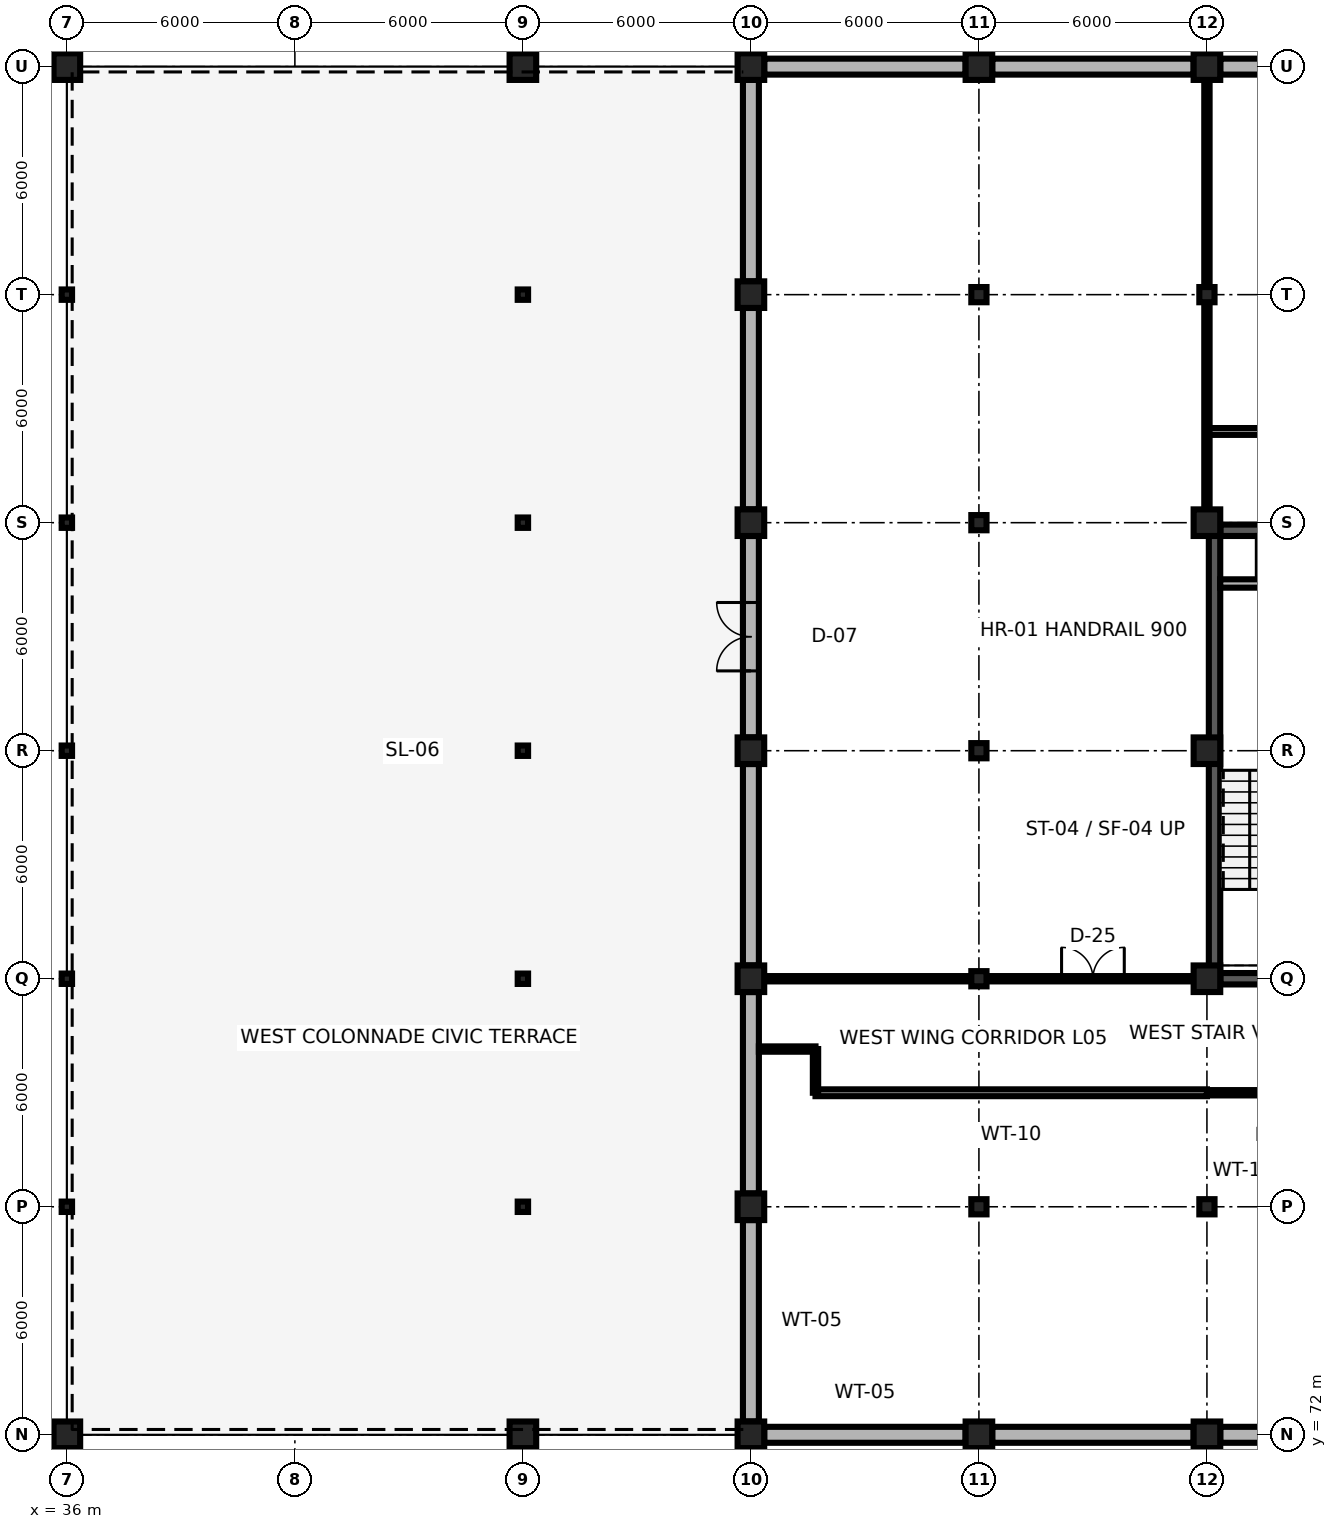
"""IFC4 building model, lengths in metres.
Left out: names, types, materials, properties, quantities, classifications, styles, units other than length and angle.
Written with IfcOpenShell. Run it as: python <this file> out.ifc"""

import sys

from ifc_helpers import new_model, si_unit, direction, frame, frame_2d, origin, origin_2d, place, context, subcontext, project, spatial, rectangle, hollow_circle, i_section, extrude, element, fill, save


model = new_model("IFC4")
c1 = context("Model", 3, precision=1e-05, world=origin(), true_north=direction((0.0, 1.0)))
c2 = subcontext(c1, "Body", "Model", "MODEL_VIEW")
j1 = project(units=[si_unit("LENGTHUNIT", "METRE"), si_unit("PLANEANGLEUNIT", "RADIAN")], contexts=[c1])
p1 = place(None, origin())
s1 = spatial("IfcSite", under=j1, at=p1, CompositionType="ELEMENT")
p2 = place(p1, origin())
s2 = spatial("IfcBuilding", under=s1, at=p2, CompositionType="ELEMENT")
p3 = place(p2, frame((0.0, 0.0, 21.0)))
s3 = spatial("IfcBuildingStorey", under=s2, at=p3, CompositionType="ELEMENT", Elevation=21.0)
for number, where, z_axis, x_axis in (
    (1, (36.0, 72.0, 0.0), (0.0, 0.0, 1.0), (1.0, 0.0, 0.0)),
    (2, (48.0, 72.0, 0.0), (0.0, 0.0, 1.0), (1.0, 0.0, 0.0)),
):
    element("IfcColumn", number, at=place(p3, frame(where, z_axis=z_axis, x_axis=x_axis)), inside=s3, PredefinedType="COLUMN", context=c2, shape_type="SweptSolid", body=[
        extrude(rectangle(XDim=0.7, YDim=0.7, at=origin_2d()), origin(), (0.0, 0.0, 1.0), 3.7),
    ])
for number, where, z_axis, x_axis in (
    (3, (54.0, 72.0, 0.0), (0.0, 0.0, 1.0), (1.0, 0.0, 0.0)),
    (4, (60.0, 72.0, 0.0), (0.0, 0.0, 1.0), (1.0, 0.0, 0.0)),
    (5, (66.0, 72.0, 0.0), (0.0, 0.0, 1.0), (1.0, 0.0, 0.0)),
):
    element("IfcColumn", number, at=place(p3, frame(where, z_axis=z_axis, x_axis=x_axis)), inside=s3, PredefinedType="COLUMN", context=c2, shape_type="SweptSolid", body=[
        extrude(rectangle(XDim=0.7, YDim=0.7, at=origin_2d()), origin(), (0.0, 0.0, 1.0), 3.9),
    ])
for number, where, z_axis, x_axis in (
    (6, (36.0, 78.0, 0.0), (0.0, 0.0, 1.0), (1.0, 0.0, 0.0)),
    (7, (48.0, 78.0, 0.0), (0.0, 0.0, 1.0), (1.0, 0.0, 0.0)),
):
    element("IfcColumn", number, at=place(p3, frame(where, z_axis=z_axis, x_axis=x_axis)), inside=s3, PredefinedType="COLUMN", context=c2, shape_type="SweptSolid", body=[
        extrude(hollow_circle(Radius=0.136, WallThickness=0.01, at=origin_2d()), origin(), (0.0, 0.0, 1.0), 3.7),
    ])
p4 = place(p3, frame((54.0, 78.0, 0.0), z_axis=(0.0, 0.0, 1.0), x_axis=(1.0, 0.0, 0.0)))
e8 = element("IfcColumn", 8, at=p4, inside=s3, PredefinedType="COLUMN", context=c2, shape_type="SweptSolid", body=[
    extrude(rectangle(XDim=0.7, YDim=0.7, at=origin_2d()), origin(), (0.0, 0.0, 1.0), 3.9),
])
for number, where, z_axis, x_axis in (
    (9, (60.0, 78.0, 0.0), (0.0, 0.0, 1.0), (1.0, 0.0, 0.0)),
    (10, (66.0, 78.0, 0.0), (0.0, 0.0, 1.0), (1.0, 0.0, 0.0)),
):
    element("IfcColumn", number, at=place(p3, frame(where, z_axis=z_axis, x_axis=x_axis)), inside=s3, PredefinedType="COLUMN", context=c2, shape_type="SweptSolid", body=[
        extrude(i_section(OverallWidth=0.4, OverallDepth=0.4, WebThickness=0.013, FlangeThickness=0.021, FilletRadius=0.022, at=origin_2d()), origin(), (0.0, 0.0, 1.0), 3.9),
    ])
for number, where, z_axis, x_axis in (
    (11, (36.0, 84.0, 0.0), (0.0, 0.0, 1.0), (1.0, 0.0, 0.0)),
    (12, (48.0, 84.0, 0.0), (0.0, 0.0, 1.0), (1.0, 0.0, 0.0)),
):
    element("IfcColumn", number, at=place(p3, frame(where, z_axis=z_axis, x_axis=x_axis)), inside=s3, PredefinedType="COLUMN", context=c2, shape_type="SweptSolid", body=[
        extrude(hollow_circle(Radius=0.136, WallThickness=0.01, at=origin_2d()), origin(), (0.0, 0.0, 1.0), 3.7),
    ])
p5 = place(p3, frame((54.0, 84.0, 0.0), z_axis=(0.0, 0.0, 1.0), x_axis=(1.0, 0.0, 0.0)))
e13 = element("IfcColumn", 13, at=p5, inside=s3, PredefinedType="COLUMN", context=c2, shape_type="SweptSolid", body=[
    extrude(rectangle(XDim=0.7, YDim=0.7, at=origin_2d()), origin(), (0.0, 0.0, 1.0), 3.9),
])
p6 = place(p3, frame((60.0, 84.0, 0.0), z_axis=(0.0, 0.0, 1.0), x_axis=(1.0, 0.0, 0.0)))
e14 = element("IfcColumn", 14, at=p6, inside=s3, PredefinedType="COLUMN", context=c2, shape_type="SweptSolid", body=[
    extrude(i_section(OverallWidth=0.4, OverallDepth=0.4, WebThickness=0.013, FlangeThickness=0.021, FilletRadius=0.022, at=origin_2d()), origin(), (0.0, 0.0, 1.0), 3.9),
])
p7 = place(p3, frame((66.0, 84.0, 0.0), z_axis=(0.0, 0.0, 1.0), x_axis=(1.0, 0.0, 0.0)))
e15 = element("IfcColumn", 15, at=p7, inside=s3, PredefinedType="COLUMN", context=c2, shape_type="SweptSolid", body=[
    extrude(rectangle(XDim=0.7, YDim=0.7, at=origin_2d()), origin(), (0.0, 0.0, 1.0), 3.9),
])
for number, where, z_axis, x_axis in (
    (16, (36.0, 90.0, 0.0), (0.0, 0.0, 1.0), (1.0, 0.0, 0.0)),
    (17, (48.0, 90.0, 0.0), (0.0, 0.0, 1.0), (1.0, 0.0, 0.0)),
):
    element("IfcColumn", number, at=place(p3, frame(where, z_axis=z_axis, x_axis=x_axis)), inside=s3, PredefinedType="COLUMN", context=c2, shape_type="SweptSolid", body=[
        extrude(hollow_circle(Radius=0.136, WallThickness=0.01, at=origin_2d()), origin(), (0.0, 0.0, 1.0), 3.7),
    ])
p8 = place(p3, frame((54.0, 90.0, 0.0), z_axis=(0.0, 0.0, 1.0), x_axis=(1.0, 0.0, 0.0)))
e18 = element("IfcColumn", 18, at=p8, inside=s3, PredefinedType="COLUMN", context=c2, shape_type="SweptSolid", body=[
    extrude(rectangle(XDim=0.7, YDim=0.7, at=origin_2d()), origin(), (0.0, 0.0, 1.0), 3.9),
])
p9 = place(p3, frame((60.0, 90.0, 0.0), z_axis=(0.0, 0.0, 1.0), x_axis=(1.0, 0.0, 0.0)))
e19 = element("IfcColumn", 19, at=p9, inside=s3, PredefinedType="COLUMN", context=c2, shape_type="SweptSolid", body=[
    extrude(i_section(OverallWidth=0.4, OverallDepth=0.4, WebThickness=0.013, FlangeThickness=0.021, FilletRadius=0.022, at=origin_2d()), origin(), (0.0, 0.0, 1.0), 3.9),
])
p10 = place(p3, frame((66.0, 90.0, 0.0), z_axis=(0.0, 0.0, 1.0), x_axis=(1.0, 0.0, 0.0)))
e20 = element("IfcColumn", 20, at=p10, inside=s3, PredefinedType="COLUMN", context=c2, shape_type="SweptSolid", body=[
    extrude(rectangle(XDim=0.7, YDim=0.7, at=origin_2d()), origin(), (0.0, 0.0, 1.0), 3.9),
])
for number, where, z_axis, x_axis in (
    (21, (36.0, 96.0, 0.0), (0.0, 0.0, 1.0), (1.0, 0.0, 0.0)),
    (22, (48.0, 96.0, 0.0), (0.0, 0.0, 1.0), (1.0, 0.0, 0.0)),
):
    element("IfcColumn", number, at=place(p3, frame(where, z_axis=z_axis, x_axis=x_axis)), inside=s3, PredefinedType="COLUMN", context=c2, shape_type="SweptSolid", body=[
        extrude(hollow_circle(Radius=0.136, WallThickness=0.01, at=origin_2d()), origin(), (0.0, 0.0, 1.0), 3.7),
    ])
p11 = place(p3, frame((54.0, 96.0, 0.0), z_axis=(0.0, 0.0, 1.0), x_axis=(1.0, 0.0, 0.0)))
e23 = element("IfcColumn", 23, at=p11, inside=s3, PredefinedType="COLUMN", context=c2, shape_type="SweptSolid", body=[
    extrude(rectangle(XDim=0.7, YDim=0.7, at=origin_2d()), origin(), (0.0, 0.0, 1.0), 3.9),
])
p12 = place(p3, frame((60.0, 96.0, 0.0), z_axis=(0.0, 0.0, 1.0), x_axis=(1.0, 0.0, 0.0)))
e24 = element("IfcColumn", 24, at=p12, inside=s3, PredefinedType="COLUMN", context=c2, shape_type="SweptSolid", body=[
    extrude(i_section(OverallWidth=0.4, OverallDepth=0.4, WebThickness=0.013, FlangeThickness=0.021, FilletRadius=0.022, at=origin_2d()), origin(), (0.0, 0.0, 1.0), 3.9),
])
p13 = place(p3, frame((66.0, 96.0, 0.0), z_axis=(0.0, 0.0, 1.0), x_axis=(1.0, 0.0, 0.0)))
e25 = element("IfcColumn", 25, at=p13, inside=s3, PredefinedType="COLUMN", context=c2, shape_type="SweptSolid", body=[
    extrude(rectangle(XDim=0.7, YDim=0.7, at=origin_2d()), origin(), (0.0, 0.0, 1.0), 3.9),
])
for number, where, z_axis, x_axis in (
    (26, (36.0, 102.0, 0.0), (0.0, 0.0, 1.0), (1.0, 0.0, 0.0)),
    (27, (48.0, 102.0, 0.0), (0.0, 0.0, 1.0), (1.0, 0.0, 0.0)),
):
    element("IfcColumn", number, at=place(p3, frame(where, z_axis=z_axis, x_axis=x_axis)), inside=s3, PredefinedType="COLUMN", context=c2, shape_type="SweptSolid", body=[
        extrude(hollow_circle(Radius=0.136, WallThickness=0.01, at=origin_2d()), origin(), (0.0, 0.0, 1.0), 3.7),
    ])
p14 = place(p3, frame((54.0, 102.0, 0.0), z_axis=(0.0, 0.0, 1.0), x_axis=(1.0, 0.0, 0.0)))
e28 = element("IfcColumn", 28, at=p14, inside=s3, PredefinedType="COLUMN", context=c2, shape_type="SweptSolid", body=[
    extrude(rectangle(XDim=0.7, YDim=0.7, at=origin_2d()), origin(), (0.0, 0.0, 1.0), 3.9),
])
for number, where, z_axis, x_axis in (
    (29, (60.0, 102.0, 0.0), (0.0, 0.0, 1.0), (1.0, 0.0, 0.0)),
    (30, (66.0, 102.0, 0.0), (0.0, 0.0, 1.0), (1.0, 0.0, 0.0)),
):
    element("IfcColumn", number, at=place(p3, frame(where, z_axis=z_axis, x_axis=x_axis)), inside=s3, PredefinedType="COLUMN", context=c2, shape_type="SweptSolid", body=[
        extrude(i_section(OverallWidth=0.4, OverallDepth=0.4, WebThickness=0.013, FlangeThickness=0.021, FilletRadius=0.022, at=origin_2d()), origin(), (0.0, 0.0, 1.0), 3.9),
    ])
for number, where, z_axis, x_axis in (
    (31, (36.0, 108.0, 0.0), (0.0, 0.0, 1.0), (1.0, 0.0, 0.0)),
    (32, (48.0, 108.0, 0.0), (0.0, 0.0, 1.0), (1.0, 0.0, 0.0)),
):
    element("IfcColumn", number, at=place(p3, frame(where, z_axis=z_axis, x_axis=x_axis)), inside=s3, PredefinedType="COLUMN", context=c2, shape_type="SweptSolid", body=[
        extrude(rectangle(XDim=0.7, YDim=0.7, at=origin_2d()), origin(), (0.0, 0.0, 1.0), 3.7),
    ])
for number, where, z_axis, x_axis in (
    (33, (54.0, 108.0, 0.0), (0.0, 0.0, 1.0), (1.0, 0.0, 0.0)),
    (34, (60.0, 108.0, 0.0), (0.0, 0.0, 1.0), (1.0, 0.0, 0.0)),
    (35, (66.0, 108.0, 0.0), (0.0, 0.0, 1.0), (1.0, 0.0, 0.0)),
):
    element("IfcColumn", number, at=place(p3, frame(where, z_axis=z_axis, x_axis=x_axis)), inside=s3, PredefinedType="COLUMN", context=c2, shape_type="SweptSolid", body=[
        extrude(rectangle(XDim=0.7, YDim=0.7, at=origin_2d()), origin(), (0.0, 0.0, 1.0), 3.9),
    ])
for number, where, z_axis, x_axis in (
    (36, (54.35, 72.0, 0.0), (0.0, 0.0, 1.0), (1.0, 0.0, 0.0)),
    (37, (60.35, 72.0, 0.0), (0.0, 0.0, 1.0), (1.0, 0.0, 0.0)),
    (38, (66.35, 72.0, 0.0), (0.0, 0.0, 1.0), (1.0, 0.0, 0.0)),
    (39, (54.35, 108.0, 0.0), (0.0, 0.0, 1.0), (1.0, 0.0, 0.0)),
    (40, (60.35, 108.0, 0.0), (0.0, 0.0, 1.0), (1.0, 0.0, 0.0)),
    (41, (66.35, 108.0, 0.0), (0.0, 0.0, 1.0), (1.0, 0.0, 0.0)),
    (42, (54.0, 72.35, 0.0), (0.0, 0.0, 1.0), (0.0, 1.0, 0.0)),
    (43, (54.0, 78.35, 0.0), (0.0, 0.0, 1.0), (0.0, 1.0, 0.0)),
    (44, (54.0, 84.35, 0.0), (0.0, 0.0, 1.0), (0.0, 1.0, 0.0)),
):
    element("IfcWall", number, at=place(p3, frame(where, z_axis=z_axis, x_axis=x_axis)), inside=s3, PredefinedType="SOLIDWALL", context=c2, shape_type="SweptSolid", body=[
        extrude(rectangle(XDim=5.3, YDim=0.42, at=frame_2d((2.65, 0.0))), origin(), (0.0, 0.0, 1.0), 3.28),
    ])
p15 = place(p3, frame((54.0, 90.35, 0.0), z_axis=(0.0, 0.0, 1.0), x_axis=(0.0, 1.0, 0.0)))
e45 = element("IfcWall", 45, at=p15, inside=s3, PredefinedType="SOLIDWALL", context=c2, shape_type="SweptSolid", body=[
    extrude(rectangle(XDim=5.3, YDim=0.42, at=frame_2d((2.65, 0.0))), origin(), (0.0, 0.0, 1.0), 3.28),
])
p16 = place(p15, frame((1.75, 0.0, 0.0)))
e46 = element("IfcOpeningElement", 46, at=p16, cuts=e45, PredefinedType="OPENING", context=c2, shape_type="SweptSolid", body=[
    extrude(rectangle(XDim=1.8, YDim=2.5, at=frame_2d((0.9, 1.25))), frame((0.0, 0.225, 0.0), z_axis=(0.0, -1.0, 0.0), x_axis=(1.0, 0.0, 0.0)), (0.0, 0.0, 1.0), 0.45),
])
for number, where, z_axis, x_axis in (
    (47, (54.0, 96.35, 0.0), (0.0, 0.0, 1.0), (0.0, 1.0, 0.0)),
    (48, (54.0, 102.35, 0.0), (0.0, 0.0, 1.0), (0.0, 1.0, 0.0)),
):
    element("IfcWall", number, at=place(p3, frame(where, z_axis=z_axis, x_axis=x_axis)), inside=s3, PredefinedType="SOLIDWALL", context=c2, shape_type="SweptSolid", body=[
        extrude(rectangle(XDim=5.3, YDim=0.42, at=frame_2d((2.65, 0.0))), origin(), (0.0, 0.0, 1.0), 3.28),
    ])
p17 = place(p3, frame((66.35, 84.0, 0.0), z_axis=(0.0, 0.0, 1.0), x_axis=(1.0, 0.0, 0.0)))
e49 = element("IfcWall", 49, at=p17, inside=s3, PredefinedType="SHEAR", context=c2, shape_type="SweptSolid", body=[
    extrude(rectangle(XDim=5.3, YDim=0.3, at=frame_2d((2.65, 0.0))), origin(), (0.0, 0.0, 1.0), 3.66),
])
p18 = place(p17, frame((1.975, 0.0, 0.0)))
e50 = element("IfcOpeningElement", 50, at=p18, cuts=e49, PredefinedType="OPENING", context=c2, shape_type="SweptSolid", body=[
    extrude(rectangle(XDim=1.35, YDim=2.2, at=frame_2d((0.675, 1.1))), frame((0.0, 0.165, 0.0), z_axis=(0.0, -1.0, 0.0), x_axis=(1.0, 0.0, 0.0)), (0.0, 0.0, 1.0), 0.33),
])
p19 = place(p3, frame((66.35, 95.8, 0.0), z_axis=(0.0, 0.0, 1.0), x_axis=(1.0, 0.0, 0.0)))
e51 = element("IfcWall", 51, at=p19, inside=s3, PredefinedType="SHEAR", context=c2, shape_type="SweptSolid", body=[
    extrude(rectangle(XDim=5.3, YDim=0.3, at=frame_2d((2.65, 0.0))), origin(), (0.0, 0.0, 1.0), 3.74),
])
p20 = place(p3, frame((66.2, 84.0, 0.0), z_axis=(0.0, 0.0, 1.0), x_axis=(0.0, 1.0, 0.0)))
e52 = element("IfcWall", 52, at=p20, inside=s3, PredefinedType="SHEAR", context=c2, shape_type="SweptSolid", body=[
    extrude(rectangle(XDim=11.8, YDim=0.3, at=frame_2d((5.9, 0.0))), origin(), (0.0, 0.0, 1.0), 3.74),
])
p21 = place(p3, frame((67.45, 94.4, 0.0), z_axis=(0.0, 0.0, 1.0), x_axis=(0.0, 1.0, 0.0)))
e53 = element("IfcWall", 53, at=p21, inside=s3, PredefinedType="PARTITIONING", context=c2, shape_type="SweptSolid", body=[
    extrude(rectangle(XDim=1.25, YDim=0.22, at=frame_2d((0.625, 0.0))), origin(), (0.0, 0.0, 1.0), 3.74),
])
p22 = place(p3, frame((66.35, 94.4, 0.0), z_axis=(0.0, 0.0, 1.0), x_axis=(1.0, 0.0, 0.0)))
e54 = element("IfcWall", 54, at=p22, inside=s3, PredefinedType="PARTITIONING", context=c2, shape_type="SweptSolid", body=[
    extrude(rectangle(XDim=1.1, YDim=0.22, at=frame_2d((0.55, 0.0))), origin(), (0.0, 0.0, 1.0), 3.74),
])
p23 = place(p3, frame((66.0, 81.0, 0.0), z_axis=(0.0, 0.0, 1.0), x_axis=(1.0, 0.0, 0.0)))
e55 = element("IfcWall", 55, at=p23, inside=s3, PredefinedType="PARTITIONING", context=c2, shape_type="SweptSolid", body=[
    extrude(rectangle(XDim=6.0, YDim=0.14, at=frame_2d((3.0, 0.0))), origin(), (0.0, 0.0, 1.0), 3.7),
])
p24 = place(p23, frame((2.175, 0.0, 0.0)))
e56 = element("IfcOpeningElement", 56, at=p24, cuts=e55, PredefinedType="OPENING", context=c2, shape_type="SweptSolid", body=[
    extrude(rectangle(XDim=1.65, YDim=2.35, at=frame_2d((0.825, 1.175))), frame((0.0, 0.085, 0.0), z_axis=(0.0, -1.0, 0.0), x_axis=(1.0, 0.0, 0.0)), (0.0, 0.0, 1.0), 0.17),
])
p25 = place(p3, frame((60.0, 84.0, 0.0), z_axis=(0.0, 0.0, 1.0), x_axis=(1.0, 0.0, 0.0)))
e57 = element("IfcWall", 57, at=p25, inside=s3, PredefinedType="PARTITIONING", context=c2, shape_type="SweptSolid", body=[
    extrude(rectangle(XDim=6.0, YDim=0.14, at=frame_2d((3.0, 0.0))), origin(), (0.0, 0.0, 1.0), 3.312),
])
p26 = place(p25, frame((2.175, 0.0, 0.0)))
e58 = element("IfcOpeningElement", 58, at=p26, cuts=e57, PredefinedType="OPENING", context=c2, shape_type="SweptSolid", body=[
    extrude(rectangle(XDim=1.65, YDim=2.35, at=frame_2d((0.825, 1.175))), frame((0.0, 0.085, 0.0), z_axis=(0.0, -1.0, 0.0), x_axis=(1.0, 0.0, 0.0)), (0.0, 0.0, 1.0), 0.17),
])
p27 = place(p3, frame((55.7, 81.0, 0.0), z_axis=(0.0, 0.0, 1.0), x_axis=(1.0, 0.0, 0.0)))
e59 = element("IfcWall", 59, at=p27, inside=s3, PredefinedType="PARTITIONING", context=c2, shape_type="SweptSolid", body=[
    extrude(rectangle(XDim=10.3, YDim=0.18, at=frame_2d((5.15, 0.0))), origin(), (0.0, 0.0, 1.0), 3.7),
])
p28 = place(p3, frame((55.7, 81.0, 0.0), z_axis=(0.0, 0.0, 1.0), x_axis=(0.0, 1.0, 0.0)))
e60 = element("IfcWall", 60, at=p28, inside=s3, PredefinedType="PARTITIONING", context=c2, shape_type="SweptSolid", body=[
    extrude(rectangle(XDim=1.15, YDim=0.14, at=frame_2d((0.575, 0.0))), origin(), (0.0, 0.0, 1.0), 3.7),
])
p29 = place(p3, frame((55.7, 82.15, 0.0), z_axis=(0.0, 0.0, 1.0), x_axis=(-1.0, 0.0, 0.0)))
e61 = element("IfcWall", 61, at=p29, inside=s3, PredefinedType="PARTITIONING", context=c2, shape_type="SweptSolid", body=[
    extrude(rectangle(XDim=1.49, YDim=0.14, at=frame_2d((0.745, 0.0))), origin(), (0.0, 0.0, 1.0), 3.7),
])
p30 = place(p3, frame((66.0, 98.4, 0.0), z_axis=(0.0, 0.0, 1.0), x_axis=(1.0, 0.0, 0.0)))
e62 = element("IfcWall", 62, at=p30, inside=s3, PredefinedType="PARTITIONING", context=c2, shape_type="SweptSolid", body=[
    extrude(rectangle(XDim=6.0, YDim=0.18, at=frame_2d((3.0, 0.0))), origin(), (0.0, 0.0, 1.0), 3.7),
])
p31 = place(p3, frame((66.0, 96.35, 0.0), z_axis=(0.0, 0.0, 1.0), x_axis=(0.0, 1.0, 0.0)))
e63 = element("IfcWall", 63, at=p31, inside=s3, PredefinedType="PARTITIONING", context=c2, shape_type="SweptSolid", body=[
    extrude(rectangle(XDim=11.3, YDim=0.14, at=frame_2d((5.65, 0.0))), origin(), (0.0, 0.0, 1.0), 3.312),
])
p32 = place(p3, frame((54.35, 84.0, 0.0), z_axis=(0.0, 0.0, 1.0), x_axis=(1.0, 0.0, 0.0)))
e64 = element("IfcWall", 64, at=p32, inside=s3, PredefinedType="PARTITIONING", context=c2, shape_type="SweptSolid", body=[
    extrude(rectangle(XDim=5.65, YDim=0.14, at=frame_2d((2.825, 0.0))), origin(), (0.0, 0.0, 1.0), 3.312),
])
p33 = place(p16, origin())
e65 = element("IfcDoor", 65, at=p33, inside=s3, OperationType="DOUBLE_DOOR_SINGLE_SWING", PredefinedType="DOOR", context=c2, shape_type="SweptSolid", body=[
    extrude(rectangle(XDim=1.8, YDim=2.5, at=frame_2d((0.9, 1.25))), frame((0.0, 0.025, 0.0), z_axis=(0.0, -1.0, 0.0), x_axis=(1.0, 0.0, 0.0)), (0.0, 0.0, 1.0), 0.05),
])
fill(e46, e65)
p34 = place(p26, origin())
e66 = element("IfcDoor", 66, at=p34, inside=s3, OperationType="DOUBLE_DOOR_SINGLE_SWING", PredefinedType="DOOR", context=c2, shape_type="SweptSolid", body=[
    extrude(rectangle(XDim=1.65, YDim=2.35, at=frame_2d((0.825, 1.175))), frame((0.0, 0.025, 0.0), z_axis=(0.0, -1.0, 0.0), x_axis=(1.0, 0.0, 0.0)), (0.0, 0.0, 1.0), 0.05),
])
fill(e58, e66)
save(model, sys.argv[1])
